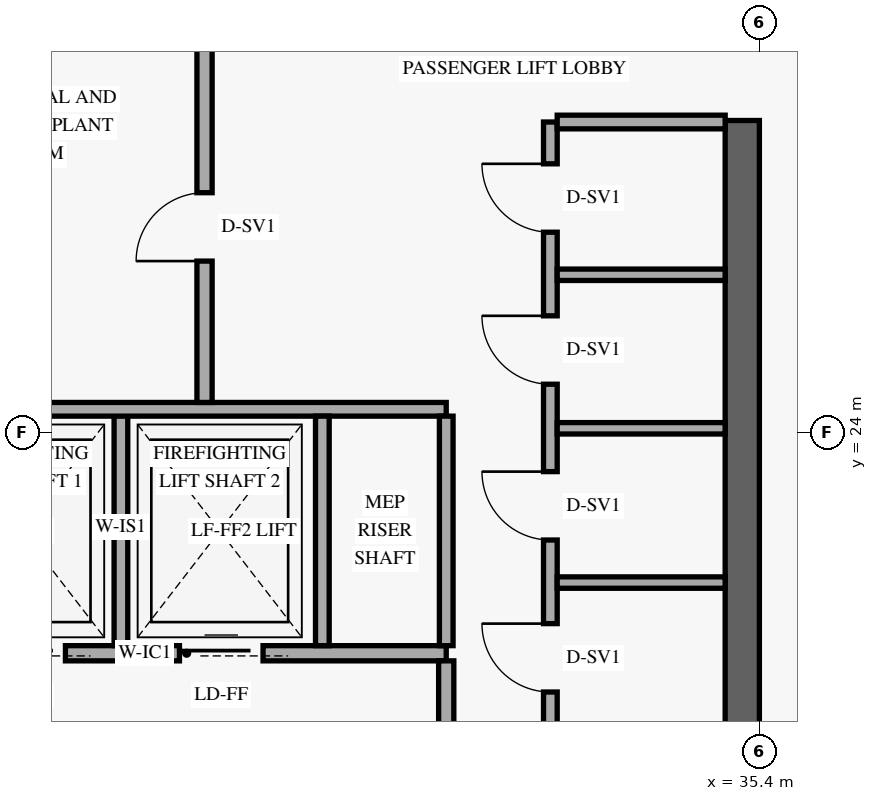
"""IFC4 building model, lengths in metres.
Left out: names, types, materials, properties, quantities, classifications, styles, units other than length and angle.
Written with IfcOpenShell. Run it as: python <this file> out.ifc"""

import sys

from ifc_helpers import new_model, si_unit, direction, frame, frame_2d, origin, place, context, subcontext, project, spatial, rectangle, extrude, element, fill, save


model = new_model("IFC4")
c1 = context("Model", 3, precision=1e-05, world=origin(), true_north=direction((0.0, 1.0)))
c2 = subcontext(c1, "Body", "Model", "MODEL_VIEW")
j1 = project(units=[si_unit("LENGTHUNIT", "METRE"), si_unit("PLANEANGLEUNIT", "RADIAN")], contexts=[c1])
p1 = place(None, origin())
s1 = spatial("IfcSite", under=j1, at=p1, CompositionType="ELEMENT")
p2 = place(p1, origin())
s2 = spatial("IfcBuilding", under=s1, at=p2, CompositionType="ELEMENT")
p3 = place(p2, frame((0.0, 0.0, -9.6)))
s3 = spatial("IfcBuildingStorey", under=s2, at=p3, CompositionType="ELEMENT", Elevation=-9.6)
p4 = place(p3, frame((35.175, 18.25, 0.0), z_axis=(0.0, 0.0, 1.0), x_axis=(0.0, 1.0, 0.0)))
e1 = element("IfcWall", 1, at=p4, inside=s3, PredefinedType="SHEAR", context=c2, shape_type="SweptSolid", body=[
    extrude(rectangle(XDim=9.85, YDim=0.45, at=frame_2d((4.925, 0.0))), origin(), (0.0, 0.0, 1.0), 3.629),
])
p5 = place(p3, frame((24.45, 21.09, 0.0), z_axis=(0.0, 0.0, 1.0), x_axis=(1.0, 0.0, 0.0)))
e2 = element("IfcWall", 2, at=p5, inside=s3, PredefinedType="STANDARD", context=c2, shape_type="SweptSolid", body=[
    extrude(rectangle(XDim=6.83, YDim=0.2, at=frame_2d((3.415, 0.0))), origin(), (0.0, 0.0, 1.0), 4.48),
])
p6 = place(p5, frame((0.72, 0.0, 0.0)))
e3 = element("IfcOpeningElement", 3, at=p6, cuts=e2, PredefinedType="OPENING", context=c2, shape_type="SweptSolid", body=[
    extrude(rectangle(XDim=1.1, YDim=2.2, at=frame_2d((0.55, 1.1))), frame((0.0, 0.11, 0.0), z_axis=(0.0, -1.0, 0.0), x_axis=(1.0, 0.0, 0.0)), (0.0, 0.0, 1.0), 0.22),
])
p7 = place(p5, frame((3.32, 0.0, 0.0)))
e4 = element("IfcOpeningElement", 4, at=p7, cuts=e2, PredefinedType="OPENING", context=c2, shape_type="SweptSolid", body=[
    extrude(rectangle(XDim=1.1, YDim=2.2, at=frame_2d((0.55, 1.1))), frame((0.0, 0.11, 0.0), z_axis=(0.0, -1.0, 0.0), x_axis=(1.0, 0.0, 0.0)), (0.0, 0.0, 1.0), 0.22),
])
p8 = place(p3, frame((31.28, 17.07, 0.0), z_axis=(0.0, 0.0, 1.0), x_axis=(0.0, 1.0, 0.0)))
e5 = element("IfcWall", 5, at=p8, inside=s3, PredefinedType="STANDARD", context=c2, shape_type="SweptSolid", body=[
    extrude(rectangle(XDim=3.92, YDim=0.2, at=frame_2d((1.96, 0.0))), origin(), (0.0, 0.0, 1.0), 3.362),
])
p9 = place(p8, frame((1.35, 0.0, 0.0)))
e6 = element("IfcOpeningElement", 6, at=p9, cuts=e5, PredefinedType="OPENING", context=c2, shape_type="SweptSolid", body=[
    extrude(rectangle(XDim=1.2, YDim=2.15, at=frame_2d((0.6, 1.075))), frame((0.0, 0.11, 0.0), z_axis=(0.0, -1.0, 0.0), x_axis=(1.0, 0.0, 0.0)), (0.0, 0.0, 1.0), 0.22),
])
p10 = place(p3, frame((27.0, 21.19, 0.0), z_axis=(0.0, 0.0, 1.0), x_axis=(0.0, 1.0, 0.0)))
e7 = element("IfcWall", 7, at=p10, inside=s3, PredefinedType="STANDARD", context=c2, shape_type="SweptSolid", body=[
    extrude(rectangle(XDim=3.11, YDim=0.18, at=frame_2d((1.555, 0.0))), origin(), (0.0, 0.0, 1.0), 4.48),
])
p11 = place(p3, frame((24.45, 24.3, 0.0), z_axis=(0.0, 0.0, 1.0), x_axis=(1.0, 0.0, 0.0)))
e8 = element("IfcWall", 8, at=p11, inside=s3, PredefinedType="STANDARD", context=c2, shape_type="SweptSolid", body=[
    extrude(rectangle(XDim=6.83, YDim=0.18, at=frame_2d((3.415, 0.0))), origin(), (0.0, 0.0, 1.0), 4.48),
])
for number, where, z_axis, x_axis in (
    (9, (29.65, 21.19, 0.0), (0.0, 0.0, 1.0), (0.0, 1.0, 0.0)),
    (10, (31.28, 21.19, 0.0), (0.0, 0.0, 1.0), (0.0, 1.0, 0.0)),
):
    element("IfcWall", number, at=place(p3, frame(where, z_axis=z_axis, x_axis=x_axis)), inside=s3, PredefinedType="STANDARD", context=c2, shape_type="SweptSolid", body=[
        extrude(rectangle(XDim=3.02, YDim=0.18, at=frame_2d((1.51, 0.0))), origin(), (0.0, 0.0, 1.0), 4.48),
    ])
p12 = place(p3, frame((28.1, 24.39, 0.0), z_axis=(0.0, 0.0, 1.0), x_axis=(0.0, 1.0, 0.0)))
e11 = element("IfcWall", 11, at=p12, inside=s3, PredefinedType="STANDARD", context=c2, shape_type="SweptSolid", body=[
    extrude(rectangle(XDim=4.75, YDim=0.2, at=frame_2d((2.375, 0.0))), origin(), (0.0, 0.0, 1.0), 4.48),
])
p13 = place(p12, frame((1.86, 0.0, 0.0)))
e12 = element("IfcOpeningElement", 12, at=p13, cuts=e11, PredefinedType="OPENING", context=c2, shape_type="SweptSolid", body=[
    extrude(rectangle(XDim=0.9, YDim=2.1, at=frame_2d((0.45, 1.05))), frame((0.0, 0.11, 0.0), z_axis=(0.0, -1.0, 0.0), x_axis=(1.0, 0.0, 0.0)), (0.0, 0.0, 1.0), 0.22),
])
p14 = place(p3, frame((32.65, 18.02, 0.0), z_axis=(0.0, 0.0, 1.0), x_axis=(0.0, 1.0, 0.0)))
e13 = element("IfcWall", 13, at=p14, inside=s3, PredefinedType="STANDARD", context=c2, shape_type="SweptSolid", body=[
    extrude(rectangle(XDim=10.06, YDim=0.18, at=frame_2d((5.03, 0.0))), origin(), (0.0, 0.0, 1.0), 4.48),
])
p15 = place(p14, frame((0.56, 0.0, 0.0)))
e14 = element("IfcOpeningElement", 14, at=p15, cuts=e13, PredefinedType="OPENING", context=c2, shape_type="SweptSolid", body=[
    extrude(rectangle(XDim=0.9, YDim=2.1, at=frame_2d((0.45, 1.05))), frame((0.0, 0.1, 0.0), z_axis=(0.0, -1.0, 0.0), x_axis=(1.0, 0.0, 0.0)), (0.0, 0.0, 1.0), 0.2),
])
p16 = place(p14, frame((2.56, 0.0, 0.0)))
e15 = element("IfcOpeningElement", 15, at=p16, cuts=e13, PredefinedType="OPENING", context=c2, shape_type="SweptSolid", body=[
    extrude(rectangle(XDim=0.9, YDim=2.1, at=frame_2d((0.45, 1.05))), frame((0.0, 0.1, 0.0), z_axis=(0.0, -1.0, 0.0), x_axis=(1.0, 0.0, 0.0)), (0.0, 0.0, 1.0), 0.2),
])
p17 = place(p14, frame((4.56, 0.0, 0.0)))
e16 = element("IfcOpeningElement", 16, at=p17, cuts=e13, PredefinedType="OPENING", context=c2, shape_type="SweptSolid", body=[
    extrude(rectangle(XDim=0.9, YDim=2.1, at=frame_2d((0.45, 1.05))), frame((0.0, 0.1, 0.0), z_axis=(0.0, -1.0, 0.0), x_axis=(1.0, 0.0, 0.0)), (0.0, 0.0, 1.0), 0.2),
])
p18 = place(p14, frame((6.61, 0.0, 0.0)))
e17 = element("IfcOpeningElement", 17, at=p18, cuts=e13, PredefinedType="OPENING", context=c2, shape_type="SweptSolid", body=[
    extrude(rectangle(XDim=0.9, YDim=2.1, at=frame_2d((0.45, 1.05))), frame((0.0, 0.1, 0.0), z_axis=(0.0, -1.0, 0.0), x_axis=(1.0, 0.0, 0.0)), (0.0, 0.0, 1.0), 0.2),
])
p19 = place(p14, frame((8.61, 0.0, 0.0)))
e18 = element("IfcOpeningElement", 18, at=p19, cuts=e13, PredefinedType="OPENING", context=c2, shape_type="SweptSolid", body=[
    extrude(rectangle(XDim=0.9, YDim=2.1, at=frame_2d((0.45, 1.05))), frame((0.0, 0.1, 0.0), z_axis=(0.0, -1.0, 0.0), x_axis=(1.0, 0.0, 0.0)), (0.0, 0.0, 1.0), 0.2),
])
p20 = place(p3, frame((32.74, 28.08, 0.0), z_axis=(0.0, 0.0, 1.0), x_axis=(1.0, 0.0, 0.0)))
e19 = element("IfcWall", 19, at=p20, inside=s3, PredefinedType="STANDARD", context=c2, shape_type="SweptSolid", body=[
    extrude(rectangle(XDim=2.21, YDim=0.18, at=frame_2d((1.105, 0.0))), origin(), (0.0, 0.0, 1.0), 4.48),
])
for number, where, z_axis, x_axis in (
    (20, (32.74, 22.02, 0.0), (0.0, 0.0, 1.0), (1.0, 0.0, 0.0)),
    (21, (32.74, 24.05, 0.0), (0.0, 0.0, 1.0), (1.0, 0.0, 0.0)),
    (22, (32.74, 26.07, 0.0), (0.0, 0.0, 1.0), (1.0, 0.0, 0.0)),
):
    element("IfcWall", number, at=place(p3, frame(where, z_axis=z_axis, x_axis=x_axis)), inside=s3, PredefinedType="STANDARD", context=c2, shape_type="SweptSolid", body=[
        extrude(rectangle(XDim=2.21, YDim=0.15, at=frame_2d((1.105, 0.0))), origin(), (0.0, 0.0, 1.0), 4.48),
    ])
p21 = place(p6, origin())
e23 = element("IfcDoor", 23, at=p21, inside=s3, OperationType="SLIDING_TO_LEFT", PredefinedType="DOOR", context=c2, shape_type="SweptSolid", body=[
    extrude(rectangle(XDim=1.1, YDim=2.2, at=frame_2d((0.55, 1.1))), frame((0.0, 0.025, 0.0), z_axis=(0.0, -1.0, 0.0), x_axis=(1.0, 0.0, 0.0)), (0.0, 0.0, 1.0), 0.05),
])
fill(e3, e23)
p22 = place(p7, origin())
e24 = element("IfcDoor", 24, at=p22, inside=s3, OperationType="SLIDING_TO_LEFT", PredefinedType="DOOR", context=c2, shape_type="SweptSolid", body=[
    extrude(rectangle(XDim=1.1, YDim=2.2, at=frame_2d((0.55, 1.1))), frame((0.0, 0.025, 0.0), z_axis=(0.0, -1.0, 0.0), x_axis=(1.0, 0.0, 0.0)), (0.0, 0.0, 1.0), 0.05),
])
fill(e4, e24)
p23 = place(p13, origin())
e25 = element("IfcDoor", 25, at=p23, inside=s3, OperationType="SINGLE_SWING_LEFT", PredefinedType="DOOR", context=c2, shape_type="SweptSolid", body=[
    extrude(rectangle(XDim=0.9, YDim=2.1, at=frame_2d((0.45, 1.05))), frame((0.0, 0.025, 0.0), z_axis=(0.0, -1.0, 0.0), x_axis=(1.0, 0.0, 0.0)), (0.0, 0.0, 1.0), 0.05),
])
fill(e12, e25)
p24 = place(p16, origin())
e26 = element("IfcDoor", 26, at=p24, inside=s3, OperationType="SINGLE_SWING_RIGHT", PredefinedType="DOOR", context=c2, shape_type="SweptSolid", body=[
    extrude(rectangle(XDim=0.9, YDim=2.1, at=frame_2d((0.45, 1.05))), frame((0.0, 0.025, 0.0), z_axis=(0.0, -1.0, 0.0), x_axis=(1.0, 0.0, 0.0)), (0.0, 0.0, 1.0), 0.05),
])
fill(e15, e26)
p25 = place(p17, origin())
e27 = element("IfcDoor", 27, at=p25, inside=s3, OperationType="SINGLE_SWING_RIGHT", PredefinedType="DOOR", context=c2, shape_type="SweptSolid", body=[
    extrude(rectangle(XDim=0.9, YDim=2.1, at=frame_2d((0.45, 1.05))), frame((0.0, 0.025, 0.0), z_axis=(0.0, -1.0, 0.0), x_axis=(1.0, 0.0, 0.0)), (0.0, 0.0, 1.0), 0.05),
])
fill(e16, e27)
p26 = place(p18, origin())
e28 = element("IfcDoor", 28, at=p26, inside=s3, OperationType="SINGLE_SWING_RIGHT", PredefinedType="DOOR", context=c2, shape_type="SweptSolid", body=[
    extrude(rectangle(XDim=0.9, YDim=2.1, at=frame_2d((0.45, 1.05))), frame((0.0, 0.025, 0.0), z_axis=(0.0, -1.0, 0.0), x_axis=(1.0, 0.0, 0.0)), (0.0, 0.0, 1.0), 0.05),
])
fill(e17, e28)
p27 = place(p19, origin())
e29 = element("IfcDoor", 29, at=p27, inside=s3, OperationType="SINGLE_SWING_RIGHT", PredefinedType="DOOR", context=c2, shape_type="SweptSolid", body=[
    extrude(rectangle(XDim=0.9, YDim=2.1, at=frame_2d((0.45, 1.05))), frame((0.0, 0.025, 0.0), z_axis=(0.0, -1.0, 0.0), x_axis=(1.0, 0.0, 0.0)), (0.0, 0.0, 1.0), 0.05),
])
fill(e18, e29)
save(model, sys.argv[1])
